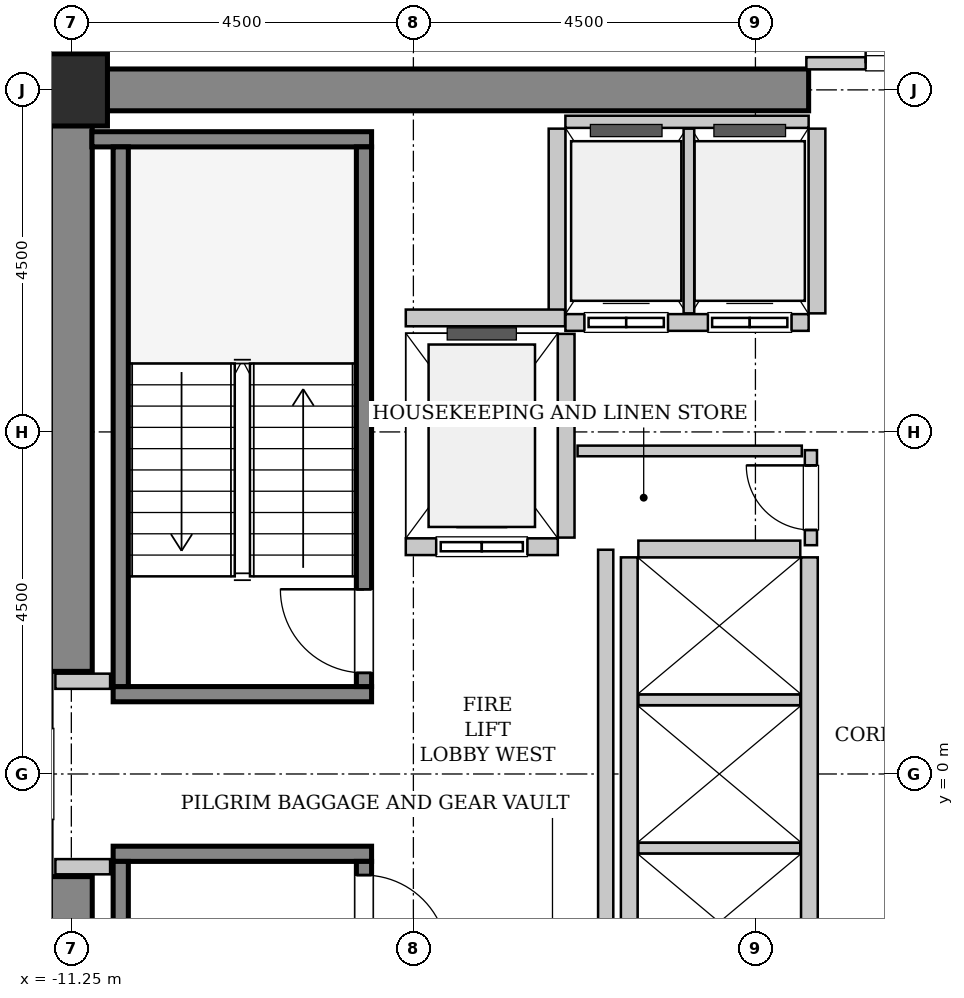
"""IFC4 building model, lengths in metres.
Left out: names, types, materials, properties, quantities, classifications, styles, units other than length and angle.
Written with IfcOpenShell. Run it as: python <this file> out.ifc"""

import sys

from ifc_helpers import new_model, si_unit, direction, frame, frame_2d, origin, origin_2d, place, context, subcontext, project, spatial, rectangle, hollow_rectangle, extrude, source, transform, mapped, element, fill, save


model = new_model("IFC4")
c1 = context("Model", 3, precision=1e-05, world=origin(), true_north=direction((0.0, 1.0)))
c2 = subcontext(c1, "Body", "Model", "MODEL_VIEW")
j1 = project(units=[si_unit("LENGTHUNIT", "METRE"), si_unit("PLANEANGLEUNIT", "RADIAN")], contexts=[c1])
p1 = place(None, origin())
s1 = spatial("IfcSite", under=j1, at=p1, CompositionType="ELEMENT")
p2 = place(p1, origin())
s2 = spatial("IfcBuilding", under=s1, at=p2, CompositionType="ELEMENT")
p3 = place(p2, frame((0.0, 0.0, 102.2)))
s3 = spatial("IfcBuildingStorey", under=s2, at=p3, CompositionType="ELEMENT", Elevation=102.2)
m1 = source(origin(), c2, "Body", "SweptSolid", [
    extrude(rectangle(XDim=9.975, YDim=0.55, at=frame_2d((4.987, 0.0))), origin(), (0.0, 0.0, 1.0), 3.8),
])
p4 = place(p3, frame((-11.525, 9.0, 0.0), z_axis=(0.0, 0.0, 1.0), x_axis=(1.0, 0.0, 0.0)))
e1 = element("IfcWall", 1, at=p4, inside=s3, PredefinedType="SHEAR", context=c2, shape_type="MappedRepresentation", body=[
    mapped(m1, transform((0.0, 0.0, 0.0), x_axis=(1.0, 0.0, 0.0), y_axis=(0.0, 1.0, 0.0), z_axis=(0.0, 0.0, 1.0), scale=1.0)),
])
m2 = source(origin(), c2, "Body", "SweptSolid", [
    extrude(rectangle(XDim=7.375, YDim=0.55, at=frame_2d((3.688, 0.0))), origin(), (0.0, 0.0, 1.0), 3.8),
])
for number, where, z_axis, x_axis in (
    (2, (-11.25, -8.725, 0.0), (0.0, 0.0, 1.0), (0.0, 1.0, 0.0)),
    (3, (-11.25, 1.35, 0.0), (0.0, 0.0, 1.0), (0.0, 1.0, 0.0)),
):
    element("IfcWall", number, at=place(p3, frame(where, z_axis=z_axis, x_axis=x_axis)), inside=s3, PredefinedType="SHEAR", context=c2, shape_type="MappedRepresentation", body=[
        mapped(m2, transform((0.0, 0.0, 0.0), x_axis=(1.0, 0.0, 0.0), y_axis=(0.0, 1.0, 0.0), z_axis=(0.0, 0.0, 1.0), scale=1.0)),
    ])
m3 = source(origin(), c2, "Body", "SweptSolid", [
    extrude(hollow_rectangle(XDim=0.95, YDim=0.95, WallThickness=0.045, InnerFilletRadius=0.045, OuterFilletRadius=0.09, at=origin_2d()), origin(), (0.0, 0.0, 1.0), 3.8),
])
p5 = place(p3, frame((-11.25, 9.0, 0.0), z_axis=(0.0, 0.0, 1.0), x_axis=(1.0, 0.0, 0.0)))
e4 = element("IfcColumn", 4, at=p5, inside=s3, PredefinedType="COLUMN", context=c2, shape_type="MappedRepresentation", body=[
    mapped(m3, transform((0.0, 0.0, 0.0), x_axis=(1.0, 0.0, 0.0), y_axis=(0.0, 1.0, 0.0), z_axis=(0.0, 0.0, 1.0), scale=1.0)),
])
m4 = source(origin(), c2, "Body", "SweptSolid", [
    extrude(rectangle(XDim=3.4, YDim=0.2, at=frame_2d((1.7, 0.0))), origin(), (0.0, 0.0, 1.0), 3.8),
])
p6 = place(p3, frame((-7.3, 1.05, 0.0), z_axis=(0.0, 0.0, 1.0), x_axis=(-1.0, 0.0, 0.0)))
e5 = element("IfcWall", 5, at=p6, inside=s3, PredefinedType="SOLIDWALL", context=c2, shape_type="MappedRepresentation", body=[
    mapped(m4, transform((0.0, 0.0, 0.0), x_axis=(1.0, 0.0, 0.0), y_axis=(0.0, 1.0, 0.0), z_axis=(0.0, 0.0, 1.0), scale=1.0)),
])
m5 = source(origin(), c2, "Body", "SweptSolid", [
    extrude(rectangle(XDim=3.68, YDim=0.2, at=frame_2d((1.84, 0.0))), origin(), (0.0, 0.0, 1.0), 3.8),
])
p7 = place(p3, frame((-7.3, 8.35, 0.0), z_axis=(0.0, 0.0, 1.0), x_axis=(-1.0, 0.0, 0.0)))
e6 = element("IfcWall", 6, at=p7, inside=s3, PredefinedType="SOLIDWALL", context=c2, shape_type="MappedRepresentation", body=[
    mapped(m5, transform((0.0, 0.0, 0.0), x_axis=(1.0, 0.0, 0.0), y_axis=(0.0, 1.0, 0.0), z_axis=(0.0, 0.0, 1.0), scale=1.0)),
])
m6 = source(origin(), c2, "Body", "SweptSolid", [
    extrude(rectangle(XDim=7.1, YDim=0.2, at=frame_2d((3.55, 0.0))), origin(), (0.0, 0.0, 1.0), 3.8),
])
p8 = place(p3, frame((-7.4, 1.15, 0.0), z_axis=(0.0, 0.0, 1.0), x_axis=(0.0, 1.0, 0.0)))
e7 = element("IfcWall", 7, at=p8, inside=s3, PredefinedType="SOLIDWALL", context=c2, shape_type="MappedRepresentation", body=[
    mapped(m6, transform((0.0, 0.0, 0.0), x_axis=(1.0, 0.0, 0.0), y_axis=(0.0, 1.0, 0.0), z_axis=(0.0, 0.0, 1.0), scale=1.0)),
])
p9 = place(p8, frame((0.18, 0.0, 0.0)))
e8 = element("IfcOpeningElement", 8, at=p9, cuts=e7, PredefinedType="OPENING", context=c2, shape_type="SweptSolid", body=[
    extrude(rectangle(XDim=1.1, YDim=2.15, at=frame_2d((0.55, 1.075))), frame((0.0, 0.11, 0.0), z_axis=(0.0, -1.0, 0.0), x_axis=(1.0, 0.0, 0.0)), (0.0, 0.0, 1.0), 0.22),
])
p10 = place(p3, frame((-10.6, 1.15, 0.0), z_axis=(0.0, 0.0, 1.0), x_axis=(0.0, 1.0, 0.0)))
e9 = element("IfcWall", 9, at=p10, inside=s3, PredefinedType="SOLIDWALL", context=c2, shape_type="MappedRepresentation", body=[
    mapped(m6, transform((0.0, 0.0, 0.0), x_axis=(1.0, 0.0, 0.0), y_axis=(0.0, 1.0, 0.0), z_axis=(0.0, 0.0, 1.0), scale=1.0)),
])
p11 = place(p3, frame((-10.7, -1.05, 0.0), z_axis=(0.0, 0.0, 1.0), x_axis=(1.0, 0.0, 0.0)))
e10 = element("IfcWall", 10, at=p11, inside=s3, PredefinedType="SOLIDWALL", context=c2, shape_type="MappedRepresentation", body=[
    mapped(m4, transform((0.0, 0.0, 0.0), x_axis=(1.0, 0.0, 0.0), y_axis=(0.0, 1.0, 0.0), z_axis=(0.0, 0.0, 1.0), scale=1.0)),
])
p12 = place(p3, frame((-10.6, -1.15, 0.0), z_axis=(0.0, 0.0, 1.0), x_axis=(0.0, -1.0, 0.0)))
e11 = element("IfcWall", 11, at=p12, inside=s3, PredefinedType="SOLIDWALL", context=c2, shape_type="MappedRepresentation", body=[
    mapped(m6, transform((0.0, 0.0, 0.0), x_axis=(1.0, 0.0, 0.0), y_axis=(0.0, 1.0, 0.0), z_axis=(0.0, 0.0, 1.0), scale=1.0)),
])
p13 = place(p3, frame((-7.4, -1.15, 0.0), z_axis=(0.0, 0.0, 1.0), x_axis=(0.0, -1.0, 0.0)))
e12 = element("IfcWall", 12, at=p13, inside=s3, PredefinedType="SOLIDWALL", context=c2, shape_type="MappedRepresentation", body=[
    mapped(m6, transform((0.0, 0.0, 0.0), x_axis=(1.0, 0.0, 0.0), y_axis=(0.0, 1.0, 0.0), z_axis=(0.0, 0.0, 1.0), scale=1.0)),
])
p14 = place(p13, frame((0.18, 0.0, 0.0)))
e13 = element("IfcOpeningElement", 13, at=p14, cuts=e12, PredefinedType="OPENING", context=c2, shape_type="SweptSolid", body=[
    extrude(rectangle(XDim=1.1, YDim=2.15, at=frame_2d((0.55, 1.075))), frame((0.0, 0.11, 0.0), z_axis=(0.0, -1.0, 0.0), x_axis=(1.0, 0.0, 0.0)), (0.0, 0.0, 1.0), 0.22),
])
m7 = source(origin(), c2, "Body", "SweptSolid", [
    extrude(rectangle(XDim=2.0, YDim=0.22, at=frame_2d((1.0, 0.0))), origin(), (0.0, 0.0, 1.0), 3.535),
])
p15 = place(p3, frame((-6.85, 2.99, 0.0), z_axis=(0.0, 0.0, 1.0), x_axis=(1.0, 0.0, 0.0)))
e14 = element("IfcWall", 14, at=p15, inside=s3, PredefinedType="SOLIDWALL", context=c2, shape_type="MappedRepresentation", body=[
    mapped(m7, transform((0.0, 0.0, 0.0), x_axis=(1.0, 0.0, 0.0), y_axis=(0.0, 1.0, 0.0), z_axis=(0.0, 0.0, 1.0), scale=1.0)),
])
p16 = place(p15, frame((0.4, 0.0, 0.0)))
e15 = element("IfcOpeningElement", 15, at=p16, cuts=e14, PredefinedType="OPENING", context=c2, shape_type="SweptSolid", body=[
    extrude(rectangle(XDim=1.2, YDim=2.2, at=frame_2d((0.6, 1.1))), frame((0.0, 0.12, 0.0), z_axis=(0.0, -1.0, 0.0), x_axis=(1.0, 0.0, 0.0)), (0.0, 0.0, 1.0), 0.24),
])
m8 = source(origin(), c2, "Body", "SweptSolid", [
    extrude(rectangle(XDim=2.68, YDim=0.22, at=frame_2d((1.34, 0.0))), origin(), (0.0, 0.0, 1.0), 3.535),
])
p17 = place(p3, frame((-4.74, 3.11, 0.0), z_axis=(0.0, 0.0, 1.0), x_axis=(0.0, 1.0, 0.0)))
e16 = element("IfcWall", 16, at=p17, inside=s3, PredefinedType="SOLIDWALL", context=c2, shape_type="MappedRepresentation", body=[
    mapped(m8, transform((0.0, 0.0, 0.0), x_axis=(1.0, 0.0, 0.0), y_axis=(0.0, 1.0, 0.0), z_axis=(0.0, 0.0, 1.0), scale=1.0)),
])
m9 = source(origin(), c2, "Body", "SweptSolid", [
    extrude(rectangle(XDim=3.2, YDim=0.22, at=frame_2d((1.6, 0.0))), origin(), (0.0, 0.0, 1.0), 3.535),
])
p18 = place(p3, frame((-4.75, 5.94, 0.0), z_axis=(0.0, 0.0, 1.0), x_axis=(1.0, 0.0, 0.0)))
e17 = element("IfcWall", 17, at=p18, inside=s3, PredefinedType="SOLIDWALL", context=c2, shape_type="MappedRepresentation", body=[
    mapped(m9, transform((0.0, 0.0, 0.0), x_axis=(1.0, 0.0, 0.0), y_axis=(0.0, 1.0, 0.0), z_axis=(0.0, 0.0, 1.0), scale=1.0)),
])
p19 = place(p18, frame((0.25, 0.0, 0.0)))
e18 = element("IfcOpeningElement", 18, at=p19, cuts=e17, PredefinedType="OPENING", context=c2, shape_type="SweptSolid", body=[
    extrude(rectangle(XDim=1.1, YDim=2.2, at=frame_2d((0.55, 1.1))), frame((0.0, 0.12, 0.0), z_axis=(0.0, -1.0, 0.0), x_axis=(1.0, 0.0, 0.0)), (0.0, 0.0, 1.0), 0.24),
])
p20 = place(p18, frame((1.875, 0.0, 0.0)))
e19 = element("IfcOpeningElement", 19, at=p20, cuts=e17, PredefinedType="OPENING", context=c2, shape_type="SweptSolid", body=[
    extrude(rectangle(XDim=1.1, YDim=2.2, at=frame_2d((0.55, 1.1))), frame((0.0, 0.12, 0.0), z_axis=(0.0, -1.0, 0.0), x_axis=(1.0, 0.0, 0.0)), (0.0, 0.0, 1.0), 0.24),
])
m10 = source(origin(), c2, "Body", "SweptSolid", [
    extrude(rectangle(XDim=3.2, YDim=0.16, at=frame_2d((1.6, 0.0))), origin(), (0.0, 0.0, 1.0), 2.425),
])
p21 = place(p3, frame((-1.55, 8.58, 0.0), z_axis=(0.0, 0.0, 1.0), x_axis=(-1.0, 0.0, 0.0)))
e20 = element("IfcWall", 20, at=p21, inside=s3, PredefinedType="PARTITIONING", context=c2, shape_type="MappedRepresentation", body=[
    mapped(m10, transform((0.0, 0.0, 0.0), x_axis=(1.0, 0.0, 0.0), y_axis=(0.0, 1.0, 0.0), z_axis=(0.0, 0.0, 1.0), scale=1.0)),
])
m11 = source(origin(), c2, "Body", "SweptSolid", [
    extrude(rectangle(XDim=2.43, YDim=0.22, at=frame_2d((1.215, 0.0))), origin(), (0.0, 0.0, 1.0), 3.535),
])
p22 = place(p3, frame((-4.86, 8.49, 0.0), z_axis=(0.0, 0.0, 1.0), x_axis=(0.0, -1.0, 0.0)))
e21 = element("IfcWall", 21, at=p22, inside=s3, PredefinedType="SOLIDWALL", context=c2, shape_type="MappedRepresentation", body=[
    mapped(m11, transform((0.0, 0.0, 0.0), x_axis=(1.0, 0.0, 0.0), y_axis=(0.0, 1.0, 0.0), z_axis=(0.0, 0.0, 1.0), scale=1.0)),
])
m12 = source(origin(), c2, "Body", "SweptSolid", [
    extrude(rectangle(XDim=2.43, YDim=0.14, at=frame_2d((1.215, 0.0))), origin(), (0.0, 0.0, 1.0), 3.535),
])
p23 = place(p3, frame((-3.125, 6.06, 0.0), z_axis=(0.0, 0.0, 1.0), x_axis=(0.0, 1.0, 0.0)))
e22 = element("IfcWall", 22, at=p23, inside=s3, PredefinedType="PARTITIONING", context=c2, shape_type="MappedRepresentation", body=[
    mapped(m12, transform((0.0, 0.0, 0.0), x_axis=(1.0, 0.0, 0.0), y_axis=(0.0, 1.0, 0.0), z_axis=(0.0, 0.0, 1.0), scale=1.0)),
])
p24 = place(p3, frame((-1.44, 6.06, 0.0), z_axis=(0.0, 0.0, 1.0), x_axis=(0.0, 1.0, 0.0)))
e23 = element("IfcWall", 23, at=p24, inside=s3, PredefinedType="SOLIDWALL", context=c2, shape_type="MappedRepresentation", body=[
    mapped(m11, transform((0.0, 0.0, 0.0), x_axis=(1.0, 0.0, 0.0), y_axis=(0.0, 1.0, 0.0), z_axis=(0.0, 0.0, 1.0), scale=1.0)),
])
m13 = source(origin(), c2, "Body", "SweptSolid", [
    extrude(rectangle(XDim=5.7, YDim=0.22, at=frame_2d((2.85, 0.0))), origin(), (0.0, 0.0, 1.0), 3.535),
])
for number, where, z_axis, x_axis in (
    (24, (-1.54, -2.85, 0.0), (0.0, 0.0, 1.0), (0.0, 1.0, 0.0)),
    (25, (-3.91, 2.85, 0.0), (0.0, 0.0, 1.0), (0.0, -1.0, 0.0)),
):
    element("IfcWall", number, at=place(p3, frame(where, z_axis=z_axis, x_axis=x_axis)), inside=s3, PredefinedType="SOLIDWALL", context=c2, shape_type="MappedRepresentation", body=[
        mapped(m13, transform((0.0, 0.0, 0.0), x_axis=(1.0, 0.0, 0.0), y_axis=(0.0, 1.0, 0.0), z_axis=(0.0, 0.0, 1.0), scale=1.0)),
    ])
m14 = source(origin(), c2, "Body", "SweptSolid", [
    extrude(rectangle(XDim=2.13, YDim=0.14, at=frame_2d((1.065, 0.0))), origin(), (0.0, 0.0, 1.0), 3.535),
])
for number, where, z_axis, x_axis in (
    (26, (-3.79, -0.975, 0.0), (0.0, 0.0, 1.0), (1.0, 0.0, 0.0)),
    (27, (-3.79, 0.975, 0.0), (0.0, 0.0, 1.0), (1.0, 0.0, 0.0)),
):
    element("IfcWall", number, at=place(p3, frame(where, z_axis=z_axis, x_axis=x_axis)), inside=s3, PredefinedType="PARTITIONING", context=c2, shape_type="MappedRepresentation", body=[
        mapped(m14, transform((0.0, 0.0, 0.0), x_axis=(1.0, 0.0, 0.0), y_axis=(0.0, 1.0, 0.0), z_axis=(0.0, 0.0, 1.0), scale=1.0)),
    ])
m15 = source(origin(), c2, "Body", "SweptSolid", [
    extrude(rectangle(XDim=2.13, YDim=0.22, at=frame_2d((1.065, 0.0))), origin(), (0.0, 0.0, 1.0), 3.535),
])
p25 = place(p3, frame((-1.66, 2.96, 0.0), z_axis=(0.0, 0.0, 1.0), x_axis=(-1.0, 0.0, 0.0)))
e28 = element("IfcWall", 28, at=p25, inside=s3, PredefinedType="SOLIDWALL", context=c2, shape_type="MappedRepresentation", body=[
    mapped(m15, transform((0.0, 0.0, 0.0), x_axis=(1.0, 0.0, 0.0), y_axis=(0.0, 1.0, 0.0), z_axis=(0.0, 0.0, 1.0), scale=1.0)),
])
m16 = source(origin(), c2, "Body", "SweptSolid", [
    extrude(rectangle(XDim=2.095, YDim=0.22, at=frame_2d((1.048, 0.0))), origin(), (0.0, 0.0, 1.0), 3.535),
])
p26 = place(p3, frame((-6.85, 6.0, 0.0), z_axis=(0.0, 0.0, 1.0), x_axis=(1.0, 0.0, 0.0)))
e29 = element("IfcWall", 29, at=p26, inside=s3, PredefinedType="SOLIDWALL", context=c2, shape_type="MappedRepresentation", body=[
    mapped(m16, transform((0.0, 0.0, 0.0), x_axis=(1.0, 0.0, 0.0), y_axis=(0.0, 1.0, 0.0), z_axis=(0.0, 0.0, 1.0), scale=1.0)),
])
m17 = source(origin(), c2, "Body", "SweptSolid", [
    extrude(rectangle(XDim=5.9, YDim=0.2, at=frame_2d((2.95, 0.0))), origin(), (0.0, 0.0, 1.0), 3.535),
])
p27 = place(p3, frame((-4.22, -2.95, 0.0), z_axis=(0.0, 0.0, 1.0), x_axis=(0.0, 1.0, 0.0)))
e30 = element("IfcWall", 30, at=p27, inside=s3, PredefinedType="PARTITIONING", context=c2, shape_type="MappedRepresentation", body=[
    mapped(m17, transform((0.0, 0.0, 0.0), x_axis=(1.0, 0.0, 0.0), y_axis=(0.0, 1.0, 0.0), z_axis=(0.0, 0.0, 1.0), scale=1.0)),
])
m18 = source(origin(), c2, "Body", "SweptSolid", [
    extrude(rectangle(XDim=0.72, YDim=0.2, at=frame_2d((0.36, 0.0))), origin(), (0.0, 0.0, 1.0), 3.535),
])
for number, where, z_axis, x_axis in (
    (31, (-11.46, 1.22, 0.0), (0.0, 0.0, 1.0), (1.0, 0.0, 0.0)),
    (32, (-11.46, -1.22, 0.0), (0.0, 0.0, 1.0), (1.0, 0.0, 0.0)),
):
    element("IfcWall", number, at=place(p3, frame(where, z_axis=z_axis, x_axis=x_axis)), inside=s3, PredefinedType="PARTITIONING", context=c2, shape_type="MappedRepresentation", body=[
        mapped(m18, transform((0.0, 0.0, 0.0), x_axis=(1.0, 0.0, 0.0), y_axis=(0.0, 1.0, 0.0), z_axis=(0.0, 0.0, 1.0), scale=1.0)),
    ])
m19 = source(origin(), c2, "Body", "SweptSolid", [
    extrude(rectangle(XDim=3.16, YDim=0.16, at=frame_2d((1.58, 0.0))), origin(), (0.0, 0.0, 1.0), 2.425),
])
p28 = place(p3, frame((-1.58, 9.35, 0.0), z_axis=(0.0, 0.0, 1.0), x_axis=(1.0, 0.0, 0.0)))
e33 = element("IfcWall", 33, at=p28, inside=s3, PredefinedType="PARTITIONING", context=c2, shape_type="MappedRepresentation", body=[
    mapped(m19, transform((0.0, 0.0, 0.0), x_axis=(1.0, 0.0, 0.0), y_axis=(0.0, 1.0, 0.0), z_axis=(0.0, 0.0, 1.0), scale=1.0)),
])
p29 = place(p28, frame((0.78, 0.0, 0.0)))
e34 = element("IfcOpeningElement", 34, at=p29, cuts=e33, PredefinedType="OPENING", context=c2, shape_type="SweptSolid", body=[
    extrude(rectangle(XDim=1.6, YDim=2.3, at=frame_2d((0.8, 1.15))), frame((0.0, 0.09, 0.0), z_axis=(0.0, -1.0, 0.0), x_axis=(1.0, 0.0, 0.0)), (0.0, 0.0, 1.0), 0.18),
])
m20 = source(origin(), c2, "Body", "SweptSolid", [
    extrude(rectangle(XDim=1.25, YDim=0.16, at=frame_2d((0.625, 0.0))), origin(), (0.0, 0.0, 1.0), 3.535),
])
p30 = place(p3, frame((-1.52, 3.01, 0.0), z_axis=(0.0, 0.0, 1.0), x_axis=(0.0, 1.0, 0.0)))
e35 = element("IfcWall", 35, at=p30, inside=s3, PredefinedType="PARTITIONING", context=c2, shape_type="MappedRepresentation", body=[
    mapped(m20, transform((0.0, 0.0, 0.0), x_axis=(1.0, 0.0, 0.0), y_axis=(0.0, 1.0, 0.0), z_axis=(0.0, 0.0, 1.0), scale=1.0)),
])
p31 = place(p30, frame((0.2, 0.0, 0.0)))
e36 = element("IfcOpeningElement", 36, at=p31, cuts=e35, PredefinedType="OPENING", context=c2, shape_type="SweptSolid", body=[
    extrude(rectangle(XDim=0.85, YDim=2.1, at=frame_2d((0.425, 1.05))), frame((0.0, 0.09, 0.0), z_axis=(0.0, -1.0, 0.0), x_axis=(1.0, 0.0, 0.0)), (0.0, 0.0, 1.0), 0.18),
])
m21 = source(origin(), c2, "Body", "SweptSolid", [
    extrude(rectangle(XDim=2.95, YDim=0.14, at=frame_2d((1.475, 0.0))), origin(), (0.0, 0.0, 1.0), 3.535),
])
p32 = place(p3, frame((-4.59, 4.25, 0.0), z_axis=(0.0, 0.0, 1.0), x_axis=(1.0, 0.0, 0.0)))
e37 = element("IfcWall", 37, at=p32, inside=s3, PredefinedType="PARTITIONING", context=c2, shape_type="MappedRepresentation", body=[
    mapped(m21, transform((0.0, 0.0, 0.0), x_axis=(1.0, 0.0, 0.0), y_axis=(0.0, 1.0, 0.0), z_axis=(0.0, 0.0, 1.0), scale=1.0)),
])
m22 = source(origin(), c2, "Body", "SweptSolid", [
    extrude(rectangle(XDim=1.1, YDim=2.15, at=frame_2d((0.55, 1.075))), frame((0.0, 0.025, 0.0), z_axis=(0.0, -1.0, 0.0), x_axis=(1.0, 0.0, 0.0)), (0.0, 0.0, 1.0), 0.05),
])
p33 = place(p9, origin())
e38 = element("IfcDoor", 38, at=p33, inside=s3, OperationType="SINGLE_SWING_RIGHT", PredefinedType="DOOR", context=c2, shape_type="MappedRepresentation", body=[
    mapped(m22, transform((0.0, 0.0, 0.0), x_axis=(1.0, 0.0, 0.0), y_axis=(0.0, 1.0, 0.0), z_axis=(0.0, 0.0, 1.0), scale=1.0)),
])
fill(e8, e38)
p34 = place(p14, origin())
e39 = element("IfcDoor", 39, at=p34, inside=s3, OperationType="SINGLE_SWING_RIGHT", PredefinedType="DOOR", context=c2, shape_type="MappedRepresentation", body=[
    mapped(m22, transform((0.0, 0.0, 0.0), x_axis=(1.0, 0.0, 0.0), y_axis=(0.0, 1.0, 0.0), z_axis=(0.0, 0.0, 1.0), scale=1.0)),
])
fill(e13, e39)
m23 = source(origin(), c2, "Body", "SweptSolid", [
    extrude(rectangle(XDim=1.2, YDim=2.2, at=frame_2d((0.6, 1.1))), frame((0.0, 0.025, 0.0), z_axis=(0.0, -1.0, 0.0), x_axis=(1.0, 0.0, 0.0)), (0.0, 0.0, 1.0), 0.05),
])
p35 = place(p16, origin())
e40 = element("IfcDoor", 40, at=p35, inside=s3, OperationType="SLIDING_TO_LEFT", PredefinedType="DOOR", context=c2, shape_type="MappedRepresentation", body=[
    mapped(m23, transform((0.0, 0.0, 0.0), x_axis=(1.0, 0.0, 0.0), y_axis=(0.0, 1.0, 0.0), z_axis=(0.0, 0.0, 1.0), scale=1.0)),
])
fill(e15, e40)
m24 = source(origin(), c2, "Body", "SweptSolid", [
    extrude(rectangle(XDim=1.1, YDim=2.2, at=frame_2d((0.55, 1.1))), frame((0.0, 0.025, 0.0), z_axis=(0.0, -1.0, 0.0), x_axis=(1.0, 0.0, 0.0)), (0.0, 0.0, 1.0), 0.05),
])
p36 = place(p19, origin())
e41 = element("IfcDoor", 41, at=p36, inside=s3, OperationType="DOUBLE_DOOR_SLIDING", PredefinedType="DOOR", context=c2, shape_type="MappedRepresentation", body=[
    mapped(m24, transform((0.0, 0.0, 0.0), x_axis=(1.0, 0.0, 0.0), y_axis=(0.0, 1.0, 0.0), z_axis=(0.0, 0.0, 1.0), scale=1.0)),
])
fill(e18, e41)
p37 = place(p20, origin())
e42 = element("IfcDoor", 42, at=p37, inside=s3, OperationType="DOUBLE_DOOR_SLIDING", PredefinedType="DOOR", context=c2, shape_type="MappedRepresentation", body=[
    mapped(m24, transform((0.0, 0.0, 0.0), x_axis=(1.0, 0.0, 0.0), y_axis=(0.0, 1.0, 0.0), z_axis=(0.0, 0.0, 1.0), scale=1.0)),
])
fill(e19, e42)
m25 = source(origin(), c2, "Body", "SweptSolid", [
    extrude(rectangle(XDim=1.6, YDim=2.3, at=frame_2d((0.8, 1.15))), frame((0.0, 0.025, 0.0), z_axis=(0.0, -1.0, 0.0), x_axis=(1.0, 0.0, 0.0)), (0.0, 0.0, 1.0), 0.05),
])
p38 = place(p29, origin())
e43 = element("IfcDoor", 43, at=p38, inside=s3, OperationType="DOUBLE_DOOR_SINGLE_SWING", PredefinedType="DOOR", context=c2, shape_type="MappedRepresentation", body=[
    mapped(m25, transform((0.0, 0.0, 0.0), x_axis=(1.0, 0.0, 0.0), y_axis=(0.0, 1.0, 0.0), z_axis=(0.0, 0.0, 1.0), scale=1.0)),
])
fill(e34, e43)
m26 = source(origin(), c2, "Body", "SweptSolid", [
    extrude(rectangle(XDim=0.85, YDim=2.1, at=frame_2d((0.425, 1.05))), frame((0.0, 0.025, 0.0), z_axis=(0.0, -1.0, 0.0), x_axis=(1.0, 0.0, 0.0)), (0.0, 0.0, 1.0), 0.05),
])
p39 = place(p31, origin())
e44 = element("IfcDoor", 44, at=p39, inside=s3, OperationType="SINGLE_SWING_RIGHT", PredefinedType="DOOR", context=c2, shape_type="MappedRepresentation", body=[
    mapped(m26, transform((0.0, 0.0, 0.0), x_axis=(1.0, 0.0, 0.0), y_axis=(0.0, 1.0, 0.0), z_axis=(0.0, 0.0, 1.0), scale=1.0)),
])
fill(e36, e44)
save(model, sys.argv[1])
